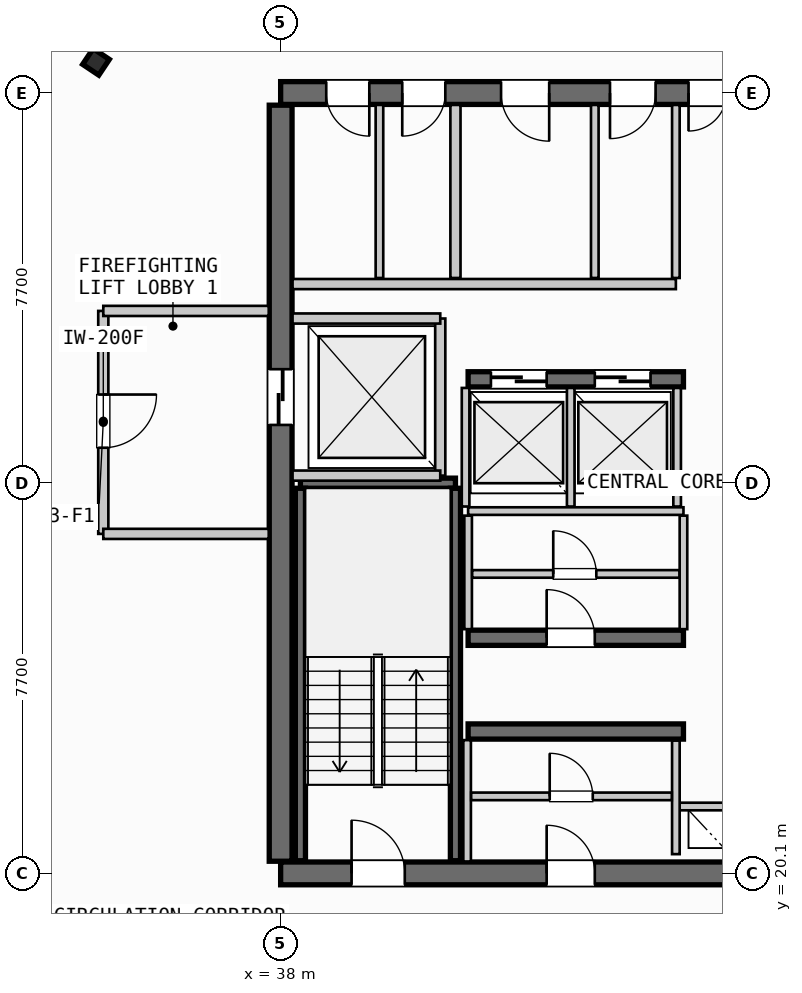
"""IFC4 building model, lengths in metres.
Left out: names, types, materials, properties, quantities, classifications, styles, units other than length and angle.
Written with IfcOpenShell. Run it as: python <this file> out.ifc"""

import sys

from ifc_helpers import new_model, si_unit, direction, frame, frame_2d, origin, origin_2d, place, context, subcontext, project, spatial, rectangle, i_section, extrude, source, transform, mapped, element, fill, save


model = new_model("IFC4")
c1 = context("Model", 3, precision=1e-05, world=origin(), true_north=direction((0.0, 1.0)))
c2 = subcontext(c1, "Body", "Model", "MODEL_VIEW")
j1 = project(units=[si_unit("LENGTHUNIT", "METRE"), si_unit("PLANEANGLEUNIT", "RADIAN")], contexts=[c1])
p1 = place(None, origin())
s1 = spatial("IfcSite", under=j1, at=p1, CompositionType="ELEMENT")
p2 = place(p1, origin())
s2 = spatial("IfcBuilding", under=s1, at=p2, CompositionType="ELEMENT")
p3 = place(p2, frame((0.0, 0.0, 276.7)))
s3 = spatial("IfcBuildingStorey", under=s2, at=p3, CompositionType="ELEMENT", Elevation=276.7)
p4 = place(p3, frame((38.0, 20.1, 0.0), z_axis=(0.0, 0.0, 1.0), x_axis=(1.0, 0.0, 0.0)))
e1 = element("IfcWall", 1, at=p4, inside=s3, PredefinedType="SHEAR", context=c2, shape_type="SweptSolid", body=[
    extrude(rectangle(XDim=17.6, YDim=0.45, at=frame_2d((8.8, 0.0))), origin(), (0.0, 0.0, 1.0), 3.21),
])
p5 = place(p4, frame((1.4, 0.0, 0.0)))
e2 = element("IfcOpeningElement", 2, at=p5, cuts=e1, PredefinedType="OPENING", context=c2, shape_type="SweptSolid", body=[
    extrude(rectangle(XDim=1.05, YDim=2.15, at=frame_2d((0.525, 1.075))), frame((0.0, 0.235, 0.0), z_axis=(0.0, -1.0, 0.0), x_axis=(1.0, 0.0, 0.0)), (0.0, 0.0, 1.0), 0.47),
])
p6 = place(p4, frame((15.15, 0.0, 0.0)))
e3 = element("IfcOpeningElement", 3, at=p6, cuts=e1, PredefinedType="OPENING", context=c2, shape_type="SweptSolid", body=[
    extrude(rectangle(XDim=1.05, YDim=2.15, at=frame_2d((0.525, 1.075))), frame((0.0, 0.235, 0.0), z_axis=(0.0, -1.0, 0.0), x_axis=(1.0, 0.0, 0.0)), (0.0, 0.0, 1.0), 0.47),
])
p7 = place(p4, frame((5.25, 0.0, 0.0)))
e4 = element("IfcOpeningElement", 4, at=p7, cuts=e1, PredefinedType="OPENING", context=c2, shape_type="SweptSolid", body=[
    extrude(rectangle(XDim=0.95, YDim=2.15, at=frame_2d((0.475, 1.075))), frame((0.0, 0.235, 0.0), z_axis=(0.0, -1.0, 0.0), x_axis=(1.0, 0.0, 0.0)), (0.0, 0.0, 1.0), 0.47),
])
p8 = place(p4, frame((11.4, 0.0, 0.0)))
e5 = element("IfcOpeningElement", 5, at=p8, cuts=e1, PredefinedType="OPENING", context=c2, shape_type="SweptSolid", body=[
    extrude(rectangle(XDim=0.95, YDim=2.15, at=frame_2d((0.475, 1.075))), frame((0.0, 0.235, 0.0), z_axis=(0.0, -1.0, 0.0), x_axis=(1.0, 0.0, 0.0)), (0.0, 0.0, 1.0), 0.47),
])
p9 = place(p3, frame((55.6, 35.5, 0.0), z_axis=(0.0, 0.0, 1.0), x_axis=(-1.0, 0.0, 0.0)))
e6 = element("IfcWall", 6, at=p9, inside=s3, PredefinedType="SHEAR", context=c2, shape_type="SweptSolid", body=[
    extrude(rectangle(XDim=17.6, YDim=0.45, at=frame_2d((8.8, 0.0))), origin(), (0.0, 0.0, 1.0), 3.21),
])
p10 = place(p9, frame((8.05, 0.0, 0.0)))
e7 = element("IfcOpeningElement", 7, at=p10, cuts=e6, PredefinedType="OPENING", context=c2, shape_type="SweptSolid", body=[
    extrude(rectangle(XDim=1.5, YDim=2.2, at=frame_2d((0.75, 1.1))), frame((0.0, 0.235, 0.0), z_axis=(0.0, -1.0, 0.0), x_axis=(1.0, 0.0, 0.0)), (0.0, 0.0, 1.0), 0.47),
])
p11 = place(p9, frame((15.85, 0.0, 0.0)))
e8 = element("IfcOpeningElement", 8, at=p11, cuts=e6, PredefinedType="OPENING", context=c2, shape_type="SweptSolid", body=[
    extrude(rectangle(XDim=0.85, YDim=2.15, at=frame_2d((0.425, 1.075))), frame((0.0, 0.235, 0.0), z_axis=(0.0, -1.0, 0.0), x_axis=(1.0, 0.0, 0.0)), (0.0, 0.0, 1.0), 0.47),
])
p12 = place(p9, frame((14.35, 0.0, 0.0)))
e9 = element("IfcOpeningElement", 9, at=p12, cuts=e6, PredefinedType="OPENING", context=c2, shape_type="SweptSolid", body=[
    extrude(rectangle(XDim=0.85, YDim=2.15, at=frame_2d((0.425, 1.075))), frame((0.0, 0.235, 0.0), z_axis=(0.0, -1.0, 0.0), x_axis=(1.0, 0.0, 0.0)), (0.0, 0.0, 1.0), 0.47),
])
p13 = place(p9, frame((12.3, 0.0, 0.0)))
e10 = element("IfcOpeningElement", 10, at=p13, cuts=e6, PredefinedType="OPENING", context=c2, shape_type="SweptSolid", body=[
    extrude(rectangle(XDim=0.95, YDim=2.15, at=frame_2d((0.475, 1.075))), frame((0.0, 0.235, 0.0), z_axis=(0.0, -1.0, 0.0), x_axis=(1.0, 0.0, 0.0)), (0.0, 0.0, 1.0), 0.47),
])
p14 = place(p9, frame((10.2, 0.0, 0.0)))
e11 = element("IfcOpeningElement", 11, at=p14, cuts=e6, PredefinedType="OPENING", context=c2, shape_type="SweptSolid", body=[
    extrude(rectangle(XDim=0.9, YDim=2.15, at=frame_2d((0.45, 1.075))), frame((0.0, 0.235, 0.0), z_axis=(0.0, -1.0, 0.0), x_axis=(1.0, 0.0, 0.0)), (0.0, 0.0, 1.0), 0.47),
])
p15 = place(p3, frame((38.0, 35.26, 0.0), z_axis=(0.0, 0.0, 1.0), x_axis=(0.0, -1.0, 0.0)))
e12 = element("IfcWall", 12, at=p15, inside=s3, PredefinedType="SHEAR", context=c2, shape_type="SweptSolid", body=[
    extrude(rectangle(XDim=14.92, YDim=0.45, at=frame_2d((7.46, 0.0))), origin(), (0.0, 0.0, 1.0), 3.21),
])
p16 = place(p15, frame((5.21, 0.0, 0.0)))
e13 = element("IfcOpeningElement", 13, at=p16, cuts=e12, PredefinedType="OPENING", context=c2, shape_type="SweptSolid", body=[
    extrude(rectangle(XDim=1.1, YDim=2.2, at=frame_2d((0.55, 1.1))), frame((0.0, 0.235, 0.0), z_axis=(0.0, -1.0, 0.0), x_axis=(1.0, 0.0, 0.0)), (0.0, 0.0, 1.0), 0.47),
])
p17 = place(p3, frame((41.7, 22.9, 0.0), z_axis=(0.0, 0.0, 1.0), x_axis=(1.0, 0.0, 0.0)))
e14 = element("IfcWall", 14, at=p17, inside=s3, PredefinedType="SHEAR", context=c2, shape_type="SweptSolid", body=[
    extrude(rectangle(XDim=4.25, YDim=0.3, at=frame_2d((2.125, 0.0))), origin(), (0.0, 0.0, 1.0), 3.21),
])
p18 = place(p3, frame((41.7, 24.75, 0.0), z_axis=(0.0, 0.0, 1.0), x_axis=(1.0, 0.0, 0.0)))
e15 = element("IfcWall", 15, at=p18, inside=s3, PredefinedType="SHEAR", context=c2, shape_type="SweptSolid", body=[
    extrude(rectangle(XDim=4.25, YDim=0.3, at=frame_2d((2.125, 0.0))), origin(), (0.0, 0.0, 1.0), 3.21),
])
p19 = place(p18, frame((1.55, 0.0, 0.0)))
e16 = element("IfcOpeningElement", 16, at=p19, cuts=e15, PredefinedType="OPENING", context=c2, shape_type="SweptSolid", body=[
    extrude(rectangle(XDim=0.95, YDim=2.15, at=frame_2d((0.475, 1.075))), frame((0.0, 0.16, 0.0), z_axis=(0.0, -1.0, 0.0), x_axis=(1.0, 0.0, 0.0)), (0.0, 0.0, 1.0), 0.32),
])
p20 = place(p3, frame((41.7, 29.85, 0.0), z_axis=(0.0, 0.0, 1.0), x_axis=(1.0, 0.0, 0.0)))
e17 = element("IfcWall", 17, at=p20, inside=s3, PredefinedType="SHEAR", context=c2, shape_type="SweptSolid", body=[
    extrude(rectangle(XDim=4.25, YDim=0.3, at=frame_2d((2.125, 0.0))), origin(), (0.0, 0.0, 1.0), 3.21),
])
p21 = place(p20, frame((0.45, 0.0, 0.0)))
e18 = element("IfcOpeningElement", 18, at=p21, cuts=e17, PredefinedType="OPENING", context=c2, shape_type="SweptSolid", body=[
    extrude(rectangle(XDim=1.1, YDim=2.2, at=frame_2d((0.55, 1.1))), frame((0.0, 0.16, 0.0), z_axis=(0.0, -1.0, 0.0), x_axis=(1.0, 0.0, 0.0)), (0.0, 0.0, 1.0), 0.32),
])
p22 = place(p20, frame((2.5, 0.0, 0.0)))
e19 = element("IfcOpeningElement", 19, at=p22, cuts=e17, PredefinedType="OPENING", context=c2, shape_type="SweptSolid", body=[
    extrude(rectangle(XDim=1.1, YDim=2.2, at=frame_2d((0.55, 1.1))), frame((0.0, 0.16, 0.0), z_axis=(0.0, -1.0, 0.0), x_axis=(1.0, 0.0, 0.0)), (0.0, 0.0, 1.0), 0.32),
])
m1 = source(origin(), c2, "Body", "SweptSolid", [
    extrude(i_section(OverallWidth=0.374, OverallDepth=0.383, WebThickness=0.017, FlangeThickness=0.026, FilletRadius=0.015, at=origin_2d()), origin(), (0.0, 0.0, 1.0), 3.21),
])
p23 = place(p3, frame((34.356, 36.115, 0.0), z_axis=(0.0, 0.0, 1.0), x_axis=(-0.831469612303, 0.55557023302, 0.0)))
e20 = element("IfcColumn", 20, at=p23, inside=s3, PredefinedType="COLUMN", context=c2, shape_type="MappedRepresentation", body=[
    mapped(m1, transform((0.0, 0.0, 0.0), scale=1.0)),
])
p24 = place(p3, frame((38.39, 27.8, 0.0), z_axis=(0.0, 0.0, 1.0), x_axis=(1.0, 0.0, 0.0)))
e21 = element("IfcWall", 21, at=p24, inside=s3, PredefinedType="SHEAR", context=c2, shape_type="SweptSolid", body=[
    extrude(rectangle(XDim=3.06, YDim=0.2, at=frame_2d((1.53, 0.0))), origin(), (0.0, 0.0, 1.0), 3.21),
])
for number, where, z_axis, x_axis in (
    (22, (41.45, 27.7, 0.0), (0.0, 0.0, 1.0), (0.0, -1.0, 0.0)),
    (23, (38.39, 20.35, 0.0), (0.0, 0.0, 1.0), (0.0, 1.0, 0.0)),
):
    element("IfcWall", number, at=place(p3, frame(where, z_axis=z_axis, x_axis=x_axis)), inside=s3, PredefinedType="SHEAR", context=c2, shape_type="SweptSolid", body=[
        extrude(rectangle(XDim=7.35, YDim=0.2, at=frame_2d((3.675, 0.0))), origin(), (0.0, 0.0, 1.0), 3.21),
    ])
p25 = place(p3, frame((45.8, 21.42, 0.0), z_axis=(0.0, 0.0, 1.0), x_axis=(1.0, 0.0, 0.0)))
e24 = element("IfcWall", 24, at=p25, inside=s3, PredefinedType="PARTITIONING", context=c2, shape_type="SweptSolid", body=[
    extrude(rectangle(XDim=2.0, YDim=0.15, at=frame_2d((1.0, 0.0))), origin(), (0.0, 0.0, 1.0), 2.455),
])
p26 = place(p3, frame((45.8, 20.48, 0.0), z_axis=(0.0, 0.0, 1.0), x_axis=(0.0, 1.0, 0.0)))
e25 = element("IfcWall", 25, at=p26, inside=s3, PredefinedType="PARTITIONING", context=c2, shape_type="SweptSolid", body=[
    extrude(rectangle(XDim=2.24, YDim=0.15, at=frame_2d((1.12, 0.0))), origin(), (0.0, 0.0, 1.0), 2.455),
])
p27 = place(p3, frame((41.15, 27.95, 0.0), z_axis=(0.0, 0.0, 1.0), x_axis=(0.0, 1.0, 0.0)))
e26 = element("IfcWall", 26, at=p27, inside=s3, PredefinedType="PARTITIONING", context=c2, shape_type="SweptSolid", body=[
    extrude(rectangle(XDim=3.1, YDim=0.2, at=frame_2d((1.55, 0.0))), origin(), (0.0, 0.0, 1.0), 2.455),
])
for number, where, z_axis, x_axis in (
    (27, (38.235, 27.95, 0.0), (0.0, 0.0, 1.0), (1.0, 0.0, 0.0)),
    (28, (38.235, 31.05, 0.0), (0.0, 0.0, 1.0), (1.0, 0.0, 0.0)),
):
    element("IfcWall", number, at=place(p3, frame(where, z_axis=z_axis, x_axis=x_axis)), inside=s3, PredefinedType="PARTITIONING", context=c2, shape_type="SweptSolid", body=[
        extrude(rectangle(XDim=2.915, YDim=0.2, at=frame_2d((1.458, 0.0))), origin(), (0.0, 0.0, 1.0), 2.455),
    ])
p28 = place(p3, frame((34.5, 31.2, 0.0), z_axis=(0.0, 0.0, 1.0), x_axis=(0.0, -1.0, 0.0)))
e29 = element("IfcWall", 29, at=p28, inside=s3, PredefinedType="PARTITIONING", context=c2, shape_type="SweptSolid", body=[
    extrude(rectangle(XDim=4.4, YDim=0.2, at=frame_2d((2.2, 0.0))), origin(), (0.0, 0.0, 1.0), 2.455),
])
p29 = place(p28, frame((1.65, 0.0, 0.0)))
e30 = element("IfcOpeningElement", 30, at=p29, cuts=e29, PredefinedType="OPENING", context=c2, shape_type="SweptSolid", body=[
    extrude(rectangle(XDim=1.05, YDim=2.15, at=frame_2d((0.525, 1.075))), frame((0.0, 0.11, 0.0), z_axis=(0.0, -1.0, 0.0), x_axis=(1.0, 0.0, 0.0)), (0.0, 0.0, 1.0), 0.22),
])
for number, where, z_axis, x_axis in (
    (31, (34.5, 26.8, 0.0), (0.0, 0.0, 1.0), (1.0, 0.0, 0.0)),
    (32, (34.5, 31.2, 0.0), (0.0, 0.0, 1.0), (1.0, 0.0, 0.0)),
):
    element("IfcWall", number, at=place(p3, frame(where, z_axis=z_axis, x_axis=x_axis)), inside=s3, PredefinedType="PARTITIONING", context=c2, shape_type="SweptSolid", body=[
        extrude(rectangle(XDim=3.265, YDim=0.2, at=frame_2d((1.632, 0.0))), origin(), (0.0, 0.0, 1.0), 2.455),
    ])
p30 = place(p3, frame((41.68, 20.335, 0.0), z_axis=(0.0, 0.0, 1.0), x_axis=(0.0, 1.0, 0.0)))
e33 = element("IfcWall", 33, at=p30, inside=s3, PredefinedType="PARTITIONING", context=c2, shape_type="SweptSolid", body=[
    extrude(rectangle(XDim=2.395, YDim=0.15, at=frame_2d((1.198, 0.0))), origin(), (0.0, 0.0, 1.0), 2.455),
])
p31 = place(p3, frame((41.76, 21.62, 0.0), z_axis=(0.0, 0.0, 1.0), x_axis=(1.0, 0.0, 0.0)))
e34 = element("IfcWall", 34, at=p31, inside=s3, PredefinedType="PARTITIONING", context=c2, shape_type="SweptSolid", body=[
    extrude(rectangle(XDim=3.96, YDim=0.15, at=frame_2d((1.98, 0.0))), origin(), (0.0, 0.0, 1.0), 2.455),
])
p32 = place(p31, frame((1.55, 0.0, 0.0)))
e35 = element("IfcOpeningElement", 35, at=p32, cuts=e34, PredefinedType="OPENING", context=c2, shape_type="SweptSolid", body=[
    extrude(rectangle(XDim=0.85, YDim=2.15, at=frame_2d((0.425, 1.075))), frame((0.0, 0.085, 0.0), z_axis=(0.0, -1.0, 0.0), x_axis=(1.0, 0.0, 0.0)), (0.0, 0.0, 1.0), 0.17),
])
p33 = place(p3, frame((41.7, 27.25, 0.0), z_axis=(0.0, 0.0, 1.0), x_axis=(1.0, 0.0, 0.0)))
e36 = element("IfcWall", 36, at=p33, inside=s3, PredefinedType="PARTITIONING", context=c2, shape_type="SweptSolid", body=[
    extrude(rectangle(XDim=4.25, YDim=0.15, at=frame_2d((2.125, 0.0))), origin(), (0.0, 0.0, 1.0), 2.455),
])
for number, where, z_axis, x_axis in (
    (37, (41.7, 24.92, 0.0), (0.0, 0.0, 1.0), (0.0, 1.0, 0.0)),
    (38, (45.95, 24.92, 0.0), (0.0, 0.0, 1.0), (0.0, 1.0, 0.0)),
):
    element("IfcWall", number, at=place(p3, frame(where, z_axis=z_axis, x_axis=x_axis)), inside=s3, PredefinedType="PARTITIONING", context=c2, shape_type="SweptSolid", body=[
        extrude(rectangle(XDim=2.24, YDim=0.15, at=frame_2d((1.12, 0.0))), origin(), (0.0, 0.0, 1.0), 2.455),
    ])
p34 = place(p3, frame((41.78, 26.01, 0.0), z_axis=(0.0, 0.0, 1.0), x_axis=(1.0, 0.0, 0.0)))
e39 = element("IfcWall", 39, at=p34, inside=s3, PredefinedType="PARTITIONING", context=c2, shape_type="SweptSolid", body=[
    extrude(rectangle(XDim=4.09, YDim=0.15, at=frame_2d((2.045, 0.0))), origin(), (0.0, 0.0, 1.0), 2.455),
])
p35 = place(p34, frame((1.6, 0.0, 0.0)))
e40 = element("IfcOpeningElement", 40, at=p35, cuts=e39, PredefinedType="OPENING", context=c2, shape_type="SweptSolid", body=[
    extrude(rectangle(XDim=0.85, YDim=2.15, at=frame_2d((0.425, 1.075))), frame((0.0, 0.085, 0.0), z_axis=(0.0, -1.0, 0.0), x_axis=(1.0, 0.0, 0.0)), (0.0, 0.0, 1.0), 0.17),
])
for number, where, z_axis, x_axis in (
    (41, (41.65, 27.34, 0.0), (0.0, 0.0, 1.0), (0.0, 1.0, 0.0)),
    (42, (43.725, 27.34, 0.0), (0.0, 0.0, 1.0), (0.0, 1.0, 0.0)),
    (43, (45.825, 27.34, 0.0), (0.0, 0.0, 1.0), (0.0, 1.0, 0.0)),
):
    element("IfcWall", number, at=place(p3, frame(where, z_axis=z_axis, x_axis=x_axis)), inside=s3, PredefinedType="PARTITIONING", context=c2, shape_type="SweptSolid", body=[
        extrude(rectangle(XDim=2.34, YDim=0.15, at=frame_2d((1.17, 0.0))), origin(), (0.0, 0.0, 1.0), 2.455),
    ])
p36 = place(p3, frame((41.45, 31.85, 0.0), z_axis=(0.0, 0.0, 1.0), x_axis=(0.0, 1.0, 0.0)))
e44 = element("IfcWall", 44, at=p36, inside=s3, PredefinedType="PARTITIONING", context=c2, shape_type="SweptSolid", body=[
    extrude(rectangle(XDim=3.415, YDim=0.2, at=frame_2d((1.708, 0.0))), origin(), (0.0, 0.0, 1.0), 2.455),
])
p37 = place(p3, frame((38.235, 31.73, 0.0), z_axis=(0.0, 0.0, 1.0), x_axis=(1.0, 0.0, 0.0)))
e45 = element("IfcWall", 45, at=p37, inside=s3, PredefinedType="PARTITIONING", context=c2, shape_type="SweptSolid", body=[
    extrude(rectangle(XDim=7.565, YDim=0.2, at=frame_2d((3.782, 0.0))), origin(), (0.0, 0.0, 1.0), 2.455),
])
for number, where, z_axis, x_axis in (
    (46, (45.8, 31.85, 0.0), (0.0, 0.0, 1.0), (0.0, 1.0, 0.0)),
    (47, (39.95, 31.85, 0.0), (0.0, 0.0, 1.0), (0.0, 1.0, 0.0)),
):
    element("IfcWall", number, at=place(p3, frame(where, z_axis=z_axis, x_axis=x_axis)), inside=s3, PredefinedType="PARTITIONING", context=c2, shape_type="SweptSolid", body=[
        extrude(rectangle(XDim=3.415, YDim=0.15, at=frame_2d((1.708, 0.0))), origin(), (0.0, 0.0, 1.0), 2.455),
    ])
p38 = place(p3, frame((44.2, 31.85, 0.0), z_axis=(0.0, 0.0, 1.0), x_axis=(0.0, 1.0, 0.0)))
e48 = element("IfcWall", 48, at=p38, inside=s3, PredefinedType="PLUMBINGWALL", context=c2, shape_type="SweptSolid", body=[
    extrude(rectangle(XDim=3.415, YDim=0.15, at=frame_2d((1.708, 0.0))), origin(), (0.0, 0.0, 1.0), 2.455),
])
m2 = source(origin(), c2, "Body", "SweptSolid", [
    extrude(rectangle(XDim=1.05, YDim=2.15, at=frame_2d((0.525, 1.075))), frame((0.0, 0.025, 0.0), z_axis=(0.0, -1.0, 0.0), x_axis=(1.0, 0.0, 0.0)), (0.0, 0.0, 1.0), 0.05),
])
p39 = place(p5, origin())
e49 = element("IfcDoor", 49, at=p39, inside=s3, OperationType="SINGLE_SWING_LEFT", PredefinedType="DOOR", context=c2, shape_type="MappedRepresentation", body=[
    mapped(m2, transform((0.0, 0.0, 0.0), scale=1.0)),
])
fill(e2, e49)
m3 = source(origin(), c2, "Body", "SweptSolid", [
    extrude(rectangle(XDim=1.5, YDim=2.2, at=frame_2d((0.75, 1.1))), frame((0.0, 0.025, 0.0), z_axis=(0.0, -1.0, 0.0), x_axis=(1.0, 0.0, 0.0)), (0.0, 0.0, 1.0), 0.05),
])
p40 = place(p10, origin())
e50 = element("IfcDoor", 50, at=p40, inside=s3, OperationType="DOUBLE_DOOR_SINGLE_SWING", PredefinedType="DOOR", context=c2, shape_type="MappedRepresentation", body=[
    mapped(m3, transform((0.0, 0.0, 0.0), scale=1.0)),
])
fill(e7, e50)
m4 = source(origin(), c2, "Body", "SweptSolid", [
    extrude(rectangle(XDim=1.1, YDim=2.2, at=frame_2d((0.55, 1.1))), frame((0.0, 0.025, 0.0), z_axis=(0.0, -1.0, 0.0), x_axis=(1.0, 0.0, 0.0)), (0.0, 0.0, 1.0), 0.05),
])
p41 = place(p16, origin())
e51 = element("IfcDoor", 51, at=p41, inside=s3, OperationType="SLIDING_TO_LEFT", PredefinedType="DOOR", context=c2, shape_type="MappedRepresentation", body=[
    mapped(m4, transform((0.0, 0.0, 0.0), scale=1.0)),
])
fill(e13, e51)
m5 = source(origin(), c2, "Body", "SweptSolid", [
    extrude(rectangle(XDim=0.95, YDim=2.15, at=frame_2d((0.475, 1.075))), frame((0.0, 0.025, 0.0), z_axis=(0.0, -1.0, 0.0), x_axis=(1.0, 0.0, 0.0)), (0.0, 0.0, 1.0), 0.05),
])
p42 = place(p7, origin())
e52 = element("IfcDoor", 52, at=p42, inside=s3, OperationType="SINGLE_SWING_LEFT", PredefinedType="DOOR", context=c2, shape_type="MappedRepresentation", body=[
    mapped(m5, transform((0.0, 0.0, 0.0), scale=1.0)),
])
fill(e4, e52)
p43 = place(p19, origin())
e53 = element("IfcDoor", 53, at=p43, inside=s3, OperationType="SINGLE_SWING_LEFT", PredefinedType="DOOR", context=c2, shape_type="MappedRepresentation", body=[
    mapped(m5, transform((0.0, 0.0, 0.0), scale=1.0)),
])
fill(e16, e53)
p44 = place(p21, origin())
e54 = element("IfcDoor", 54, at=p44, inside=s3, OperationType="SLIDING_TO_LEFT", PredefinedType="DOOR", context=c2, shape_type="MappedRepresentation", body=[
    mapped(m4, transform((0.0, 0.0, 0.0), scale=1.0)),
])
fill(e18, e54)
p45 = place(p22, origin())
e55 = element("IfcDoor", 55, at=p45, inside=s3, OperationType="SLIDING_TO_LEFT", PredefinedType="DOOR", context=c2, shape_type="MappedRepresentation", body=[
    mapped(m4, transform((0.0, 0.0, 0.0), scale=1.0)),
])
fill(e19, e55)
m6 = source(origin(), c2, "Body", "SweptSolid", [
    extrude(rectangle(XDim=0.85, YDim=2.15, at=frame_2d((0.425, 1.075))), frame((0.0, 0.025, 0.0), z_axis=(0.0, -1.0, 0.0), x_axis=(1.0, 0.0, 0.0)), (0.0, 0.0, 1.0), 0.05),
])
p46 = place(p11, origin())
e56 = element("IfcDoor", 56, at=p46, inside=s3, OperationType="SINGLE_SWING_LEFT", PredefinedType="DOOR", context=c2, shape_type="MappedRepresentation", body=[
    mapped(m6, transform((0.0, 0.0, 0.0), scale=1.0)),
])
fill(e8, e56)
p47 = place(p12, origin())
e57 = element("IfcDoor", 57, at=p47, inside=s3, OperationType="SINGLE_SWING_RIGHT", PredefinedType="DOOR", context=c2, shape_type="MappedRepresentation", body=[
    mapped(m6, transform((0.0, 0.0, 0.0), scale=1.0)),
])
fill(e9, e57)
p48 = place(p13, origin())
e58 = element("IfcDoor", 58, at=p48, inside=s3, OperationType="SINGLE_SWING_LEFT", PredefinedType="DOOR", context=c2, shape_type="MappedRepresentation", body=[
    mapped(m5, transform((0.0, 0.0, 0.0), scale=1.0)),
])
fill(e10, e58)
m7 = source(origin(), c2, "Body", "SweptSolid", [
    extrude(rectangle(XDim=0.9, YDim=2.15, at=frame_2d((0.45, 1.075))), frame((0.0, 0.025, 0.0), z_axis=(0.0, -1.0, 0.0), x_axis=(1.0, 0.0, 0.0)), (0.0, 0.0, 1.0), 0.05),
])
p49 = place(p14, origin())
e59 = element("IfcDoor", 59, at=p49, inside=s3, OperationType="SINGLE_SWING_RIGHT", PredefinedType="DOOR", context=c2, shape_type="MappedRepresentation", body=[
    mapped(m7, transform((0.0, 0.0, 0.0), scale=1.0)),
])
fill(e11, e59)
p50 = place(p29, origin())
e60 = element("IfcDoor", 60, at=p50, inside=s3, OperationType="SINGLE_SWING_LEFT", PredefinedType="DOOR", context=c2, shape_type="MappedRepresentation", body=[
    mapped(m2, transform((0.0, 0.0, 0.0), scale=1.0)),
])
fill(e30, e60)
p51 = place(p32, origin())
e61 = element("IfcDoor", 61, at=p51, inside=s3, OperationType="SINGLE_SWING_LEFT", PredefinedType="DOOR", context=c2, shape_type="MappedRepresentation", body=[
    mapped(m6, transform((0.0, 0.0, 0.0), scale=1.0)),
])
fill(e35, e61)
p52 = place(p35, origin())
e62 = element("IfcDoor", 62, at=p52, inside=s3, OperationType="SINGLE_SWING_LEFT", PredefinedType="DOOR", context=c2, shape_type="MappedRepresentation", body=[
    mapped(m6, transform((0.0, 0.0, 0.0), scale=1.0)),
])
fill(e40, e62)
save(model, sys.argv[1])
